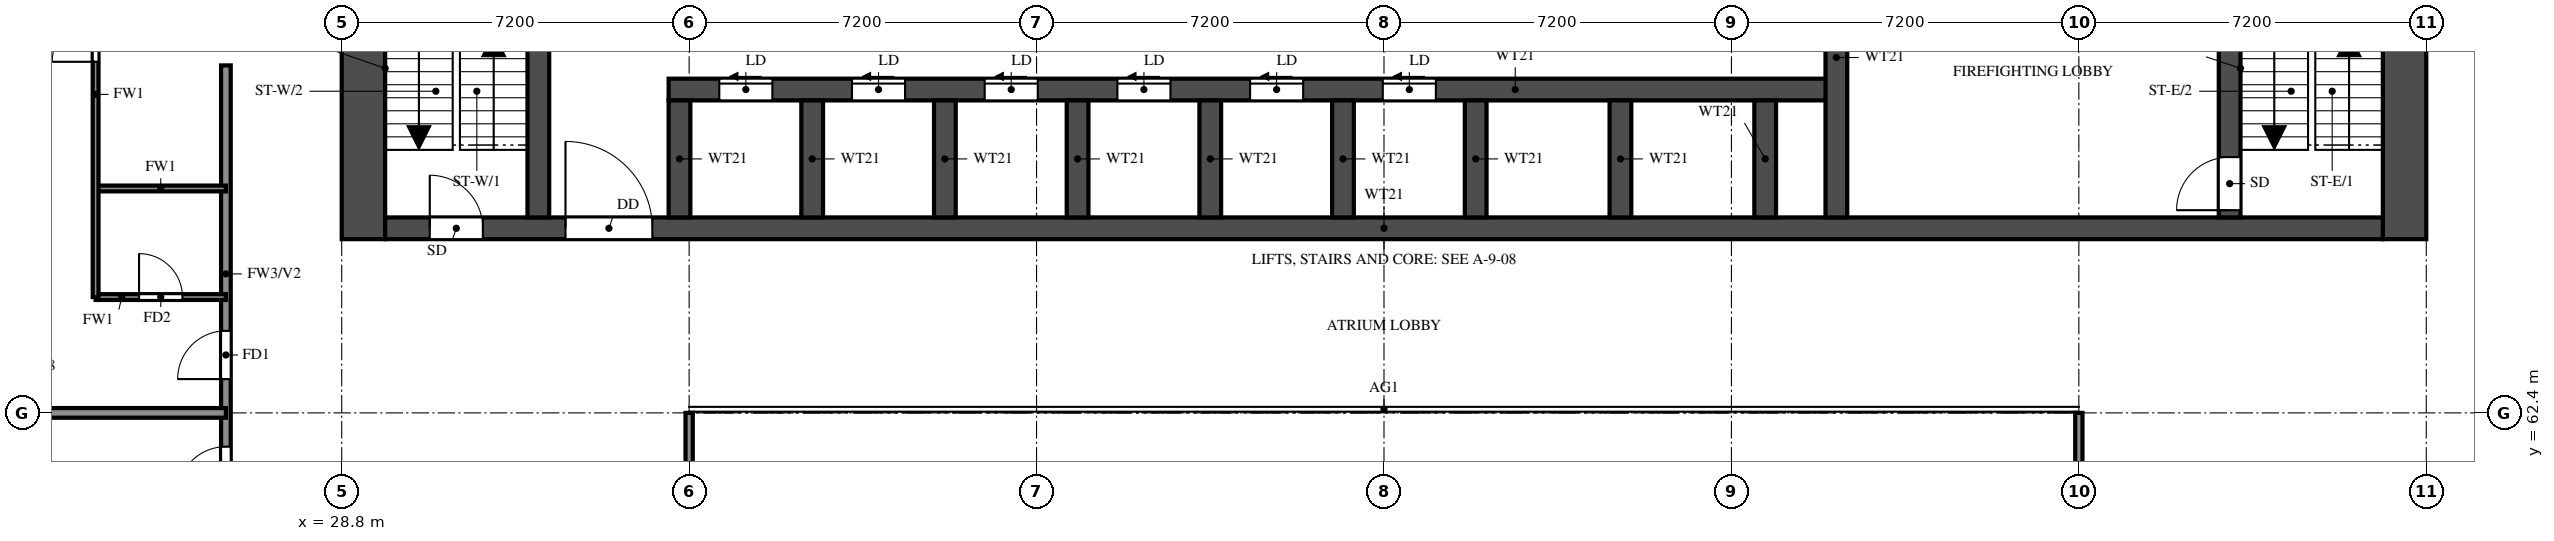
"""IFC4 building model, lengths in metres.
Left out: names, types, materials, properties, quantities, classifications, styles, units other than length and angle.
Written with IfcOpenShell. Run it as: python <this file> out.ifc"""

import sys

from ifc_helpers import new_model, si_unit, direction, frame, frame_2d, origin, place, context, subcontext, project, spatial, rectangle, extrude, element, fill, save


model = new_model("IFC4")
c1 = context("Model", 3, precision=1e-05, world=origin(), true_north=direction((0.0, 1.0)))
c2 = subcontext(c1, "Body", "Model", "MODEL_VIEW")
j1 = project(units=[si_unit("LENGTHUNIT", "METRE"), si_unit("PLANEANGLEUNIT", "RADIAN")], contexts=[c1])
p1 = place(None, origin())
s1 = spatial("IfcSite", under=j1, at=p1, CompositionType="ELEMENT")
p2 = place(p1, origin())
s2 = spatial("IfcBuilding", under=s1, at=p2, CompositionType="ELEMENT")
p3 = place(p2, frame((0.0, 0.0, 30.5)))
s3 = spatial("IfcBuildingStorey", under=s2, at=p3, CompositionType="ELEMENT", Elevation=30.5)
for number, where, z_axis, x_axis in (
    (1, (29.25, 66.0, 0.0), (0.0, 0.0, 1.0), (0.0, 1.0, 0.0)),
    (2, (71.55, 66.0, 0.0), (0.0, 0.0, 1.0), (0.0, 1.0, 0.0)),
):
    element("IfcWall", number, at=place(p3, frame(where, z_axis=z_axis, x_axis=x_axis)), inside=s3, PredefinedType="SHEAR", context=c2, shape_type="SweptSolid", body=[
        extrude(rectangle(XDim=12.0, YDim=0.9, at=frame_2d((6.0, 0.0))), origin(), (0.0, 0.0, 1.0), 3.18),
    ])
p4 = place(p3, frame((29.7, 66.225, 0.0), z_axis=(0.0, 0.0, 1.0), x_axis=(1.0, 0.0, 0.0)))
e3 = element("IfcWall", 3, at=p4, inside=s3, PredefinedType="SHEAR", context=c2, shape_type="SweptSolid", body=[
    extrude(rectangle(XDim=41.4, YDim=0.45, at=frame_2d((20.7, 0.0))), origin(), (0.0, 0.0, 1.0), 3.18),
])
p5 = place(p4, frame((0.925, 0.0, 0.0)))
e4 = element("IfcOpeningElement", 4, at=p5, cuts=e3, PredefinedType="OPENING", context=c2, shape_type="SweptSolid", body=[
    extrude(rectangle(XDim=1.1, YDim=2.1, at=frame_2d((0.55, 1.05))), frame((0.0, 0.235, 0.0), z_axis=(0.0, -1.0, 0.0), x_axis=(1.0, 0.0, 0.0)), (0.0, 0.0, 1.0), 0.47),
])
p6 = place(p4, frame((3.738, 0.0, 0.0)))
e5 = element("IfcOpeningElement", 5, at=p6, cuts=e3, PredefinedType="OPENING", context=c2, shape_type="SweptSolid", body=[
    extrude(rectangle(XDim=1.8, YDim=2.1, at=frame_2d((0.9, 1.05))), frame((0.0, 0.235, 0.0), z_axis=(0.0, -1.0, 0.0), x_axis=(1.0, 0.0, 0.0)), (0.0, 0.0, 1.0), 0.47),
])
p7 = place(p3, frame((35.575, 69.1, 0.0), z_axis=(0.0, 0.0, 1.0), x_axis=(1.0, 0.0, 0.0)))
e6 = element("IfcWall", 6, at=p7, inside=s3, PredefinedType="SHEAR", context=c2, shape_type="SweptSolid", body=[
    extrude(rectangle(XDim=24.2, YDim=0.45, at=frame_2d((12.1, 0.0))), origin(), (0.0, 0.0, 1.0), 3.18),
])
p8 = place(p7, frame((1.05, 0.0, 0.0)))
e7 = element("IfcOpeningElement", 7, at=p8, cuts=e6, PredefinedType="OPENING", context=c2, shape_type="SweptSolid", body=[
    extrude(rectangle(XDim=1.1, YDim=2.1, at=frame_2d((0.55, 1.05))), frame((0.0, 0.235, 0.0), z_axis=(0.0, -1.0, 0.0), x_axis=(1.0, 0.0, 0.0)), (0.0, 0.0, 1.0), 0.47),
])
p9 = place(p7, frame((3.8, 0.0, 0.0)))
e8 = element("IfcOpeningElement", 8, at=p9, cuts=e6, PredefinedType="OPENING", context=c2, shape_type="SweptSolid", body=[
    extrude(rectangle(XDim=1.1, YDim=2.1, at=frame_2d((0.55, 1.05))), frame((0.0, 0.235, 0.0), z_axis=(0.0, -1.0, 0.0), x_axis=(1.0, 0.0, 0.0)), (0.0, 0.0, 1.0), 0.47),
])
p10 = place(p7, frame((6.55, 0.0, 0.0)))
e9 = element("IfcOpeningElement", 9, at=p10, cuts=e6, PredefinedType="OPENING", context=c2, shape_type="SweptSolid", body=[
    extrude(rectangle(XDim=1.1, YDim=2.1, at=frame_2d((0.55, 1.05))), frame((0.0, 0.235, 0.0), z_axis=(0.0, -1.0, 0.0), x_axis=(1.0, 0.0, 0.0)), (0.0, 0.0, 1.0), 0.47),
])
p11 = place(p7, frame((9.3, 0.0, 0.0)))
e10 = element("IfcOpeningElement", 10, at=p11, cuts=e6, PredefinedType="OPENING", context=c2, shape_type="SweptSolid", body=[
    extrude(rectangle(XDim=1.1, YDim=2.1, at=frame_2d((0.55, 1.05))), frame((0.0, 0.235, 0.0), z_axis=(0.0, -1.0, 0.0), x_axis=(1.0, 0.0, 0.0)), (0.0, 0.0, 1.0), 0.47),
])
p12 = place(p7, frame((12.05, 0.0, 0.0)))
e11 = element("IfcOpeningElement", 11, at=p12, cuts=e6, PredefinedType="OPENING", context=c2, shape_type="SweptSolid", body=[
    extrude(rectangle(XDim=1.1, YDim=2.1, at=frame_2d((0.55, 1.05))), frame((0.0, 0.235, 0.0), z_axis=(0.0, -1.0, 0.0), x_axis=(1.0, 0.0, 0.0)), (0.0, 0.0, 1.0), 0.47),
])
p13 = place(p7, frame((14.8, 0.0, 0.0)))
e12 = element("IfcOpeningElement", 12, at=p13, cuts=e6, PredefinedType="OPENING", context=c2, shape_type="SweptSolid", body=[
    extrude(rectangle(XDim=1.1, YDim=2.1, at=frame_2d((0.55, 1.05))), frame((0.0, 0.235, 0.0), z_axis=(0.0, -1.0, 0.0), x_axis=(1.0, 0.0, 0.0)), (0.0, 0.0, 1.0), 0.47),
])
p14 = place(p3, frame((32.875, 66.45, 0.0), z_axis=(0.0, 0.0, 1.0), x_axis=(0.0, 1.0, 0.0)))
e13 = element("IfcWall", 13, at=p14, inside=s3, PredefinedType="SHEAR", context=c2, shape_type="SweptSolid", body=[
    extrude(rectangle(XDim=10.65, YDim=0.45, at=frame_2d((5.325, 0.0))), origin(), (0.0, 0.0, 1.0), 3.18),
])
p15 = place(p3, frame((67.925, 66.45, 0.0), z_axis=(0.0, 0.0, 1.0), x_axis=(0.0, 1.0, 0.0)))
e14 = element("IfcWall", 14, at=p15, inside=s3, PredefinedType="SHEAR", context=c2, shape_type="SweptSolid", body=[
    extrude(rectangle(XDim=10.65, YDim=0.45, at=frame_2d((5.325, 0.0))), origin(), (0.0, 0.0, 1.0), 3.18),
])
p16 = place(p15, frame((0.15, 0.0, 0.0)))
e15 = element("IfcOpeningElement", 15, at=p16, cuts=e14, PredefinedType="OPENING", context=c2, shape_type="SweptSolid", body=[
    extrude(rectangle(XDim=1.1, YDim=2.1, at=frame_2d((0.55, 1.05))), frame((0.0, 0.235, 0.0), z_axis=(0.0, -1.0, 0.0), x_axis=(1.0, 0.0, 0.0)), (0.0, 0.0, 1.0), 0.47),
])
p17 = place(p3, frame((59.775, 66.45, 0.0), z_axis=(0.0, 0.0, 1.0), x_axis=(0.0, 1.0, 0.0)))
e16 = element("IfcWall", 16, at=p17, inside=s3, PredefinedType="SHEAR", context=c2, shape_type="SweptSolid", body=[
    extrude(rectangle(XDim=6.025, YDim=0.45, at=frame_2d((3.013, 0.0))), origin(), (0.0, 0.0, 1.0), 3.18),
])
p18 = place(p17, frame((3.85, 0.0, 0.0)))
e17 = element("IfcOpeningElement", 17, at=p18, cuts=e16, PredefinedType="OPENING", context=c2, shape_type="SweptSolid", body=[
    extrude(rectangle(XDim=1.2, YDim=2.1, at=frame_2d((0.6, 1.05))), frame((0.0, 0.235, 0.0), z_axis=(0.0, -1.0, 0.0), x_axis=(1.0, 0.0, 0.0)), (0.0, 0.0, 1.0), 0.47),
])
for number, where, z_axis, x_axis in (
    (18, (35.8, 66.45, 0.0), (0.0, 0.0, 1.0), (0.0, 1.0, 0.0)),
    (19, (38.55, 66.45, 0.0), (0.0, 0.0, 1.0), (0.0, 1.0, 0.0)),
    (20, (41.3, 66.45, 0.0), (0.0, 0.0, 1.0), (0.0, 1.0, 0.0)),
    (21, (44.05, 66.45, 0.0), (0.0, 0.0, 1.0), (0.0, 1.0, 0.0)),
    (22, (46.8, 66.45, 0.0), (0.0, 0.0, 1.0), (0.0, 1.0, 0.0)),
    (23, (49.55, 66.45, 0.0), (0.0, 0.0, 1.0), (0.0, 1.0, 0.0)),
    (24, (52.3, 66.45, 0.0), (0.0, 0.0, 1.0), (0.0, 1.0, 0.0)),
    (25, (55.3, 66.45, 0.0), (0.0, 0.0, 1.0), (0.0, 1.0, 0.0)),
    (26, (58.3, 66.45, 0.0), (0.0, 0.0, 1.0), (0.0, 1.0, 0.0)),
):
    element("IfcWall", number, at=place(p3, frame(where, z_axis=z_axis, x_axis=x_axis)), inside=s3, PredefinedType="SHEAR", context=c2, shape_type="SweptSolid", body=[
        extrude(rectangle(XDim=2.425, YDim=0.45, at=frame_2d((1.212, 0.0))), origin(), (0.0, 0.0, 1.0), 3.18),
    ])
p19 = place(p3, frame((26.4, 60.0, 0.0), z_axis=(0.0, 0.0, 1.0), x_axis=(0.0, 1.0, 0.0)))
e27 = element("IfcWall", 27, at=p19, inside=s3, PredefinedType="SOLIDWALL", context=c2, shape_type="SweptSolid", body=[
    extrude(rectangle(XDim=9.6, YDim=0.2, at=frame_2d((4.8, 0.0))), origin(), (0.0, 0.0, 1.0), 3.18),
])
p20 = place(p19, frame((0.7, 0.0, 0.0)))
e28 = element("IfcOpeningElement", 28, at=p20, cuts=e27, PredefinedType="OPENING", context=c2, shape_type="SweptSolid", body=[
    extrude(rectangle(XDim=1.0, YDim=2.1, at=frame_2d((0.5, 1.05))), frame((0.0, 0.11, 0.0), z_axis=(0.0, -1.0, 0.0), x_axis=(1.0, 0.0, 0.0)), (0.0, 0.0, 1.0), 0.22),
])
p21 = place(p19, frame((3.1, 0.0, 0.0)))
e29 = element("IfcOpeningElement", 29, at=p21, cuts=e27, PredefinedType="OPENING", context=c2, shape_type="SweptSolid", body=[
    extrude(rectangle(XDim=1.0, YDim=2.1, at=frame_2d((0.5, 1.05))), frame((0.0, 0.11, 0.0), z_axis=(0.0, -1.0, 0.0), x_axis=(1.0, 0.0, 0.0)), (0.0, 0.0, 1.0), 0.22),
])
p22 = place(p3, frame((14.525, 62.4, 0.0), z_axis=(0.0, 0.0, 1.0), x_axis=(1.0, 0.0, 0.0)))
e30 = element("IfcWall", 30, at=p22, inside=s3, PredefinedType="SOLIDWALL", context=c2, shape_type="SweptSolid", body=[
    extrude(rectangle(XDim=11.875, YDim=0.2, at=frame_2d((5.938, 0.0))), origin(), (0.0, 0.0, 1.0), 3.18),
])
p23 = place(p3, frame((23.7, 64.8, 0.0), z_axis=(0.0, 0.0, 1.0), x_axis=(1.0, 0.0, 0.0)))
e31 = element("IfcWall", 31, at=p23, inside=s3, PredefinedType="PARTITIONING", context=c2, shape_type="SweptSolid", body=[
    extrude(rectangle(XDim=2.7, YDim=0.12, at=frame_2d((1.35, 0.0))), origin(), (0.0, 0.0, 1.0), 3.18),
])
p24 = place(p23, frame((0.9, 0.0, 0.0)))
e32 = element("IfcOpeningElement", 32, at=p24, cuts=e31, PredefinedType="OPENING", context=c2, shape_type="SweptSolid", body=[
    extrude(rectangle(XDim=0.9, YDim=2.1, at=frame_2d((0.45, 1.05))), frame((0.0, 0.07, 0.0), z_axis=(0.0, -1.0, 0.0), x_axis=(1.0, 0.0, 0.0)), (0.0, 0.0, 1.0), 0.14),
])
p25 = place(p3, frame((23.7, 67.05, 0.0), z_axis=(0.0, 0.0, 1.0), x_axis=(1.0, 0.0, 0.0)))
e33 = element("IfcWall", 33, at=p25, inside=s3, PredefinedType="PARTITIONING", context=c2, shape_type="SweptSolid", body=[
    extrude(rectangle(XDim=2.7, YDim=0.12, at=frame_2d((1.35, 0.0))), origin(), (0.0, 0.0, 1.0), 3.18),
])
p26 = place(p3, frame((23.7, 64.8, 0.0), z_axis=(0.0, 0.0, 1.0), x_axis=(0.0, 1.0, 0.0)))
e34 = element("IfcWall", 34, at=p26, inside=s3, PredefinedType="PARTITIONING", context=c2, shape_type="SweptSolid", body=[
    extrude(rectangle(XDim=8.4, YDim=0.12, at=frame_2d((4.2, 0.0))), origin(), (0.0, 0.0, 1.0), 3.18),
])
p27 = place(p26, frame((4.875, 0.0, 0.0)))
e35 = element("IfcOpeningElement", 35, at=p27, cuts=e34, PredefinedType="OPENING", context=c2, shape_type="SweptSolid", body=[
    extrude(rectangle(XDim=0.9, YDim=2.1, at=frame_2d((0.45, 1.05))), frame((0.0, 0.07, 0.0), z_axis=(0.0, -1.0, 0.0), x_axis=(1.0, 0.0, 0.0)), (0.0, 0.0, 1.0), 0.14),
])
for number, where, z_axis, x_axis in (
    (36, (36.0, 48.0, 0.0), (0.0, 0.0, 1.0), (0.0, 1.0, 0.0)),
    (37, (64.8, 48.0, 0.0), (0.0, 0.0, 1.0), (0.0, 1.0, 0.0)),
):
    element("IfcWall", number, at=place(p3, frame(where, z_axis=z_axis, x_axis=x_axis)), inside=s3, PredefinedType="SOLIDWALL", context=c2, shape_type="SweptSolid", body=[
        extrude(rectangle(XDim=14.4, YDim=0.15, at=frame_2d((7.2, 0.0))), origin(), (0.0, 0.0, 1.0), 2.28),
    ])
p28 = place(p5, origin())
e38 = element("IfcDoor", 38, at=p28, inside=s3, OperationType="SINGLE_SWING_LEFT", PredefinedType="DOOR", context=c2, shape_type="SweptSolid", body=[
    extrude(rectangle(XDim=1.1, YDim=2.1, at=frame_2d((0.55, 1.05))), frame((0.0, 0.025, 0.0), z_axis=(0.0, -1.0, 0.0), x_axis=(1.0, 0.0, 0.0)), (0.0, 0.0, 1.0), 0.05),
])
fill(e4, e38)
p29 = place(p16, origin())
e39 = element("IfcDoor", 39, at=p29, inside=s3, OperationType="SINGLE_SWING_LEFT", PredefinedType="DOOR", context=c2, shape_type="SweptSolid", body=[
    extrude(rectangle(XDim=1.1, YDim=2.1, at=frame_2d((0.55, 1.05))), frame((0.0, 0.025, 0.0), z_axis=(0.0, -1.0, 0.0), x_axis=(1.0, 0.0, 0.0)), (0.0, 0.0, 1.0), 0.05),
])
fill(e15, e39)
p30 = place(p6, origin())
e40 = element("IfcDoor", 40, at=p30, inside=s3, OperationType="DOUBLE_DOOR_SINGLE_SWING", PredefinedType="DOOR", context=c2, shape_type="SweptSolid", body=[
    extrude(rectangle(XDim=1.8, YDim=2.1, at=frame_2d((0.9, 1.05))), frame((0.0, 0.025, 0.0), z_axis=(0.0, -1.0, 0.0), x_axis=(1.0, 0.0, 0.0)), (0.0, 0.0, 1.0), 0.05),
])
fill(e5, e40)
p31 = place(p8, origin())
e41 = element("IfcDoor", 41, at=p31, inside=s3, OperationType="SLIDING_TO_LEFT", PredefinedType="DOOR", context=c2, shape_type="SweptSolid", body=[
    extrude(rectangle(XDim=1.1, YDim=2.1, at=frame_2d((0.55, 1.05))), frame((0.0, 0.025, 0.0), z_axis=(0.0, -1.0, 0.0), x_axis=(1.0, 0.0, 0.0)), (0.0, 0.0, 1.0), 0.05),
])
fill(e7, e41)
p32 = place(p9, origin())
e42 = element("IfcDoor", 42, at=p32, inside=s3, OperationType="SLIDING_TO_LEFT", PredefinedType="DOOR", context=c2, shape_type="SweptSolid", body=[
    extrude(rectangle(XDim=1.1, YDim=2.1, at=frame_2d((0.55, 1.05))), frame((0.0, 0.025, 0.0), z_axis=(0.0, -1.0, 0.0), x_axis=(1.0, 0.0, 0.0)), (0.0, 0.0, 1.0), 0.05),
])
fill(e8, e42)
p33 = place(p10, origin())
e43 = element("IfcDoor", 43, at=p33, inside=s3, OperationType="SLIDING_TO_LEFT", PredefinedType="DOOR", context=c2, shape_type="SweptSolid", body=[
    extrude(rectangle(XDim=1.1, YDim=2.1, at=frame_2d((0.55, 1.05))), frame((0.0, 0.025, 0.0), z_axis=(0.0, -1.0, 0.0), x_axis=(1.0, 0.0, 0.0)), (0.0, 0.0, 1.0), 0.05),
])
fill(e9, e43)
p34 = place(p11, origin())
e44 = element("IfcDoor", 44, at=p34, inside=s3, OperationType="SLIDING_TO_LEFT", PredefinedType="DOOR", context=c2, shape_type="SweptSolid", body=[
    extrude(rectangle(XDim=1.1, YDim=2.1, at=frame_2d((0.55, 1.05))), frame((0.0, 0.025, 0.0), z_axis=(0.0, -1.0, 0.0), x_axis=(1.0, 0.0, 0.0)), (0.0, 0.0, 1.0), 0.05),
])
fill(e10, e44)
p35 = place(p12, origin())
e45 = element("IfcDoor", 45, at=p35, inside=s3, OperationType="SLIDING_TO_LEFT", PredefinedType="DOOR", context=c2, shape_type="SweptSolid", body=[
    extrude(rectangle(XDim=1.1, YDim=2.1, at=frame_2d((0.55, 1.05))), frame((0.0, 0.025, 0.0), z_axis=(0.0, -1.0, 0.0), x_axis=(1.0, 0.0, 0.0)), (0.0, 0.0, 1.0), 0.05),
])
fill(e11, e45)
p36 = place(p13, origin())
e46 = element("IfcDoor", 46, at=p36, inside=s3, OperationType="SLIDING_TO_LEFT", PredefinedType="DOOR", context=c2, shape_type="SweptSolid", body=[
    extrude(rectangle(XDim=1.1, YDim=2.1, at=frame_2d((0.55, 1.05))), frame((0.0, 0.025, 0.0), z_axis=(0.0, -1.0, 0.0), x_axis=(1.0, 0.0, 0.0)), (0.0, 0.0, 1.0), 0.05),
])
fill(e12, e46)
p37 = place(p20, origin())
e47 = element("IfcDoor", 47, at=p37, inside=s3, OperationType="SINGLE_SWING_LEFT", PredefinedType="DOOR", context=c2, shape_type="SweptSolid", body=[
    extrude(rectangle(XDim=1.0, YDim=2.1, at=frame_2d((0.5, 1.05))), frame((0.0, 0.025, 0.0), z_axis=(0.0, -1.0, 0.0), x_axis=(1.0, 0.0, 0.0)), (0.0, 0.0, 1.0), 0.05),
])
fill(e28, e47)
p38 = place(p21, origin())
e48 = element("IfcDoor", 48, at=p38, inside=s3, OperationType="SINGLE_SWING_RIGHT", PredefinedType="DOOR", context=c2, shape_type="SweptSolid", body=[
    extrude(rectangle(XDim=1.0, YDim=2.1, at=frame_2d((0.5, 1.05))), frame((0.0, 0.025, 0.0), z_axis=(0.0, -1.0, 0.0), x_axis=(1.0, 0.0, 0.0)), (0.0, 0.0, 1.0), 0.05),
])
fill(e29, e48)
p39 = place(p24, origin())
e49 = element("IfcDoor", 49, at=p39, inside=s3, OperationType="SINGLE_SWING_LEFT", PredefinedType="DOOR", context=c2, shape_type="SweptSolid", body=[
    extrude(rectangle(XDim=0.9, YDim=2.1, at=frame_2d((0.45, 1.05))), frame((0.0, 0.025, 0.0), z_axis=(0.0, -1.0, 0.0), x_axis=(1.0, 0.0, 0.0)), (0.0, 0.0, 1.0), 0.05),
])
fill(e32, e49)
p40 = place(p27, origin())
e50 = element("IfcDoor", 50, at=p40, inside=s3, OperationType="SINGLE_SWING_RIGHT", PredefinedType="DOOR", context=c2, shape_type="SweptSolid", body=[
    extrude(rectangle(XDim=0.9, YDim=2.1, at=frame_2d((0.45, 1.05))), frame((0.0, 0.025, 0.0), z_axis=(0.0, -1.0, 0.0), x_axis=(1.0, 0.0, 0.0)), (0.0, 0.0, 1.0), 0.05),
])
fill(e35, e50)
save(model, sys.argv[1])
